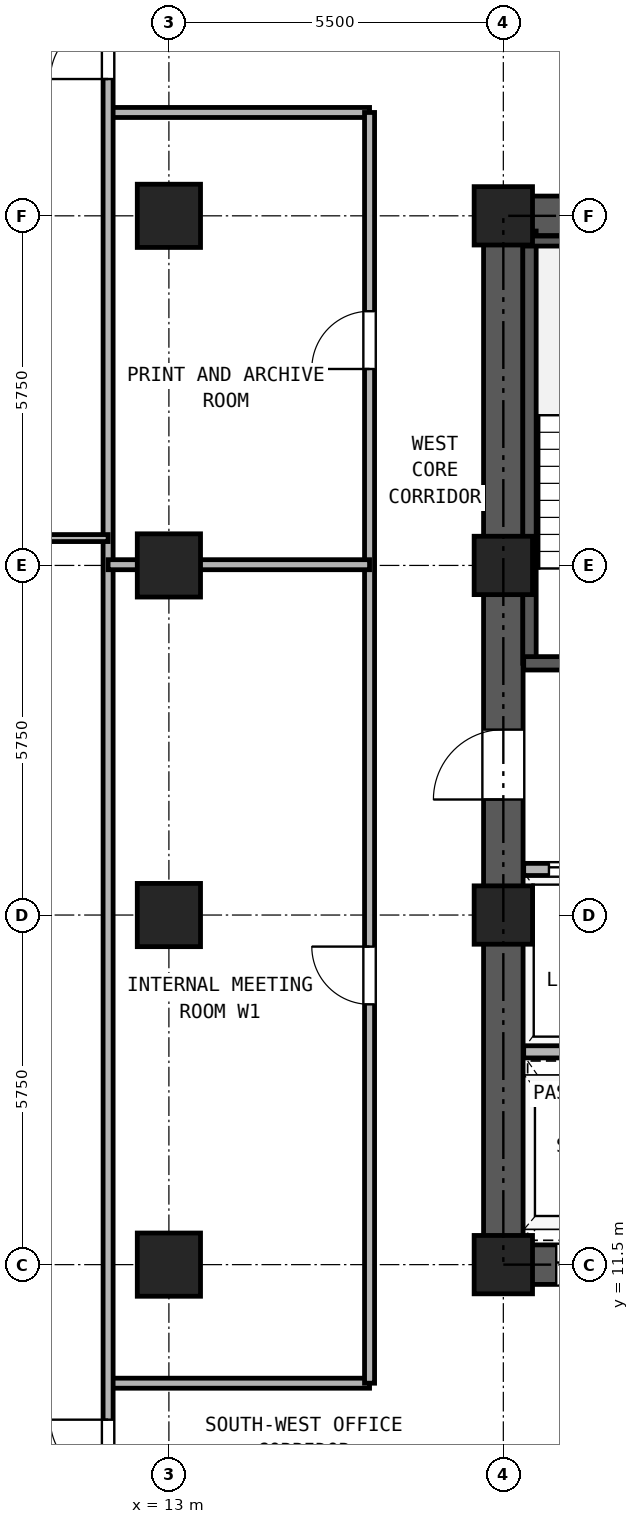
"""IFC4 building model, lengths in metres.
Left out: names, types, materials, properties, quantities, classifications, styles, units other than length and angle.
Written with IfcOpenShell. Run it as: python <this file> out.ifc"""

import sys

from ifc_helpers import new_model, si_unit, direction, frame, frame_2d, origin, origin_2d, place, context, subcontext, project, spatial, rectangle, hollow_rectangle, extrude, source, transform, mapped, element, fill, save


model = new_model("IFC4")
c1 = context("Model", 3, precision=1e-05, world=origin(), true_north=direction((0.0, 1.0)))
c2 = subcontext(c1, "Body", "Model", "MODEL_VIEW")
j1 = project(units=[si_unit("LENGTHUNIT", "METRE"), si_unit("PLANEANGLEUNIT", "RADIAN")], contexts=[c1])
p1 = place(None, origin())
s1 = spatial("IfcSite", under=j1, at=p1, CompositionType="ELEMENT")
p2 = place(p1, origin())
s2 = spatial("IfcBuilding", under=s1, at=p2, CompositionType="ELEMENT")
p3 = place(p2, frame((0.0, 0.0, 62.1)))
s3 = spatial("IfcBuildingStorey", under=s2, at=p3, CompositionType="ELEMENT", Elevation=62.1)
m1 = source(origin(), c2, "Body", "SweptSolid", [
    extrude(hollow_rectangle(XDim=1.04, YDim=1.04, WallThickness=0.065, at=origin_2d()), origin(), (0.0, 0.0, 1.0), 3.32),
])
for number, where, z_axis, x_axis in (
    (1, (13.0, 11.5, 0.0), (0.0, 0.0, 1.0), (1.0, 0.0, 0.0)),
    (2, (13.0, 17.25, 0.0), (0.0, 0.0, 1.0), (1.0, 0.0, 0.0)),
    (3, (13.0, 23.0, 0.0), (0.0, 0.0, 1.0), (1.0, 0.0, 0.0)),
    (4, (13.0, 28.75, 0.0), (0.0, 0.0, 1.0), (1.0, 0.0, 0.0)),
):
    element("IfcColumn", number, at=place(p3, frame(where, z_axis=z_axis, x_axis=x_axis)), inside=s3, PredefinedType="COLUMN", context=c2, shape_type="MappedRepresentation", body=[
        mapped(m1, transform((0.0, 0.0, 0.0), x_axis=(1.0, 0.0, 0.0), y_axis=(0.0, 1.0, 0.0), z_axis=(0.0, 0.0, 1.0), scale=1.0)),
    ])
m2 = source(origin(), c2, "Body", "SweptSolid", [
    extrude(hollow_rectangle(XDim=0.96, YDim=0.96, WallThickness=0.06, at=origin_2d()), origin(), (0.0, 0.0, 1.0), 3.32),
])
for number, where, z_axis, x_axis in (
    (5, (18.5, 11.5, 0.0), (0.0, 0.0, 1.0), (1.0, 0.0, 0.0)),
    (6, (18.5, 17.25, 0.0), (0.0, 0.0, 1.0), (1.0, 0.0, 0.0)),
    (7, (18.5, 23.0, 0.0), (0.0, 0.0, 1.0), (1.0, 0.0, 0.0)),
    (8, (18.5, 28.75, 0.0), (0.0, 0.0, 1.0), (1.0, 0.0, 0.0)),
):
    element("IfcColumn", number, at=place(p3, frame(where, z_axis=z_axis, x_axis=x_axis)), inside=s3, PredefinedType="COLUMN", context=c2, shape_type="MappedRepresentation", body=[
        mapped(m2, transform((0.0, 0.0, 0.0), x_axis=(1.0, 0.0, 0.0), y_axis=(0.0, 1.0, 0.0), z_axis=(0.0, 0.0, 1.0), scale=1.0)),
    ])
p4 = place(p3, frame((18.175, 11.5, 0.0), z_axis=(0.0, 0.0, 1.0), x_axis=(1.0, 0.0, 0.0)))
e9 = element("IfcWall", 9, at=p4, inside=s3, PredefinedType="SHEAR", context=c2, shape_type="SweptSolid", body=[
    extrude(rectangle(XDim=10.65, YDim=0.65, at=frame_2d((5.325, 0.0))), origin(), (0.0, 0.0, 1.0), 3.32),
])
p5 = place(p4, frame((1.195, 0.0, 0.0)))
e10 = element("IfcOpeningElement", 10, at=p5, cuts=e9, PredefinedType="OPENING", context=c2, shape_type="SweptSolid", body=[
    extrude(rectangle(XDim=1.1, YDim=2.25, at=frame_2d((0.55, 1.125))), frame((0.0, 0.335, 0.0), z_axis=(0.0, -1.0, 0.0), x_axis=(1.0, 0.0, 0.0)), (0.0, 0.0, 1.0), 0.67),
])
p6 = place(p4, frame((3.495, 0.0, 0.0)))
e11 = element("IfcOpeningElement", 11, at=p6, cuts=e9, PredefinedType="OPENING", context=c2, shape_type="SweptSolid", body=[
    extrude(rectangle(XDim=1.1, YDim=2.25, at=frame_2d((0.55, 1.125))), frame((0.0, 0.335, 0.0), z_axis=(0.0, -1.0, 0.0), x_axis=(1.0, 0.0, 0.0)), (0.0, 0.0, 1.0), 0.67),
])
p7 = place(p4, frame((5.925, 0.0, 0.0)))
e12 = element("IfcOpeningElement", 12, at=p7, cuts=e9, PredefinedType="OPENING", context=c2, shape_type="SweptSolid", body=[
    extrude(rectangle(XDim=1.1, YDim=2.25, at=frame_2d((0.55, 1.125))), frame((0.0, 0.335, 0.0), z_axis=(0.0, -1.0, 0.0), x_axis=(1.0, 0.0, 0.0)), (0.0, 0.0, 1.0), 0.67),
])
p8 = place(p4, frame((8.325, 0.0, 0.0)))
e13 = element("IfcOpeningElement", 13, at=p8, cuts=e9, PredefinedType="OPENING", context=c2, shape_type="SweptSolid", body=[
    extrude(rectangle(XDim=1.1, YDim=2.25, at=frame_2d((0.55, 1.125))), frame((0.0, 0.335, 0.0), z_axis=(0.0, -1.0, 0.0), x_axis=(1.0, 0.0, 0.0)), (0.0, 0.0, 1.0), 0.67),
])
p9 = place(p3, frame((18.175, 28.75, 0.0), z_axis=(0.0, 0.0, 1.0), x_axis=(1.0, 0.0, 0.0)))
e14 = element("IfcWall", 14, at=p9, inside=s3, PredefinedType="SHEAR", context=c2, shape_type="SweptSolid", body=[
    extrude(rectangle(XDim=10.65, YDim=0.65, at=frame_2d((5.325, 0.0))), origin(), (0.0, 0.0, 1.0), 3.32),
])
p10 = place(p9, frame((4.205, 0.0, 0.0)))
e15 = element("IfcOpeningElement", 15, at=p10, cuts=e14, PredefinedType="OPENING", context=c2, shape_type="SweptSolid", body=[
    extrude(rectangle(XDim=0.9, YDim=2.05, at=frame_2d((0.45, 1.025))), frame((0.0, 0.335, 0.0), z_axis=(0.0, -1.0, 0.0), x_axis=(1.0, 0.0, 0.0)), (0.0, 0.0, 1.0), 0.67),
])
p11 = place(p9, frame((5.745, 0.0, 0.0)))
e16 = element("IfcOpeningElement", 16, at=p11, cuts=e14, PredefinedType="OPENING", context=c2, shape_type="SweptSolid", body=[
    extrude(rectangle(XDim=0.9, YDim=2.05, at=frame_2d((0.45, 1.025))), frame((0.0, 0.335, 0.0), z_axis=(0.0, -1.0, 0.0), x_axis=(1.0, 0.0, 0.0)), (0.0, 0.0, 1.0), 0.67),
])
p12 = place(p3, frame((18.5, 11.825, 0.0), z_axis=(0.0, 0.0, 1.0), x_axis=(0.0, 1.0, 0.0)))
e17 = element("IfcWall", 17, at=p12, inside=s3, PredefinedType="SHEAR", context=c2, shape_type="SweptSolid", body=[
    extrude(rectangle(XDim=16.6, YDim=0.65, at=frame_2d((8.3, 0.0))), origin(), (0.0, 0.0, 1.0), 3.32),
])
p13 = place(p12, frame((7.325, 0.0, 0.0)))
e18 = element("IfcOpeningElement", 18, at=p13, cuts=e17, PredefinedType="OPENING", context=c2, shape_type="SweptSolid", body=[
    extrude(rectangle(XDim=1.15, YDim=2.2, at=frame_2d((0.575, 1.1))), frame((0.0, 0.335, 0.0), z_axis=(0.0, -1.0, 0.0), x_axis=(1.0, 0.0, 0.0)), (0.0, 0.0, 1.0), 0.67),
])
p14 = place(p3, frame((18.93, 21.39, 0.0), z_axis=(0.0, 0.0, 1.0), x_axis=(0.0, 1.0, 0.0)))
e19 = element("IfcWall", 19, at=p14, inside=s3, PredefinedType="SOLIDWALL", context=c2, shape_type="SweptSolid", body=[
    extrude(rectangle(XDim=7.11, YDim=0.22, at=frame_2d((3.555, 0.0))), origin(), (0.0, 0.0, 1.0), 3.32),
])
p15 = place(p3, frame((18.835, 28.335, 0.0), z_axis=(0.0, 0.0, 1.0), x_axis=(1.0, 0.0, 0.0)))
e20 = element("IfcWall", 20, at=p15, inside=s3, PredefinedType="PARTITIONING", context=c2, shape_type="SweptSolid", body=[
    extrude(rectangle(XDim=3.275, YDim=0.165, at=frame_2d((1.638, 0.0))), origin(), (0.0, 0.0, 1.0), 3.32),
])
p16 = place(p3, frame((18.835, 21.39, 0.0), z_axis=(0.0, 0.0, 1.0), x_axis=(1.0, 0.0, 0.0)))
e21 = element("IfcWall", 21, at=p16, inside=s3, PredefinedType="SOLIDWALL", context=c2, shape_type="SweptSolid", body=[
    extrude(rectangle(XDim=6.295, YDim=0.22, at=frame_2d((3.147, 0.0))), origin(), (0.0, 0.0, 1.0), 3.32),
])
p17 = place(p16, frame((1.015, 0.0, 0.0)))
e22 = element("IfcOpeningElement", 22, at=p17, cuts=e21, PredefinedType="OPENING", context=c2, shape_type="SweptSolid", body=[
    extrude(rectangle(XDim=1.15, YDim=2.2, at=frame_2d((0.575, 1.1))), frame((0.0, 0.12, 0.0), z_axis=(0.0, -1.0, 0.0), x_axis=(1.0, 0.0, 0.0)), (0.0, 0.0, 1.0), 0.24),
])
p18 = place(p16, frame((4.745, 0.0, 0.0)))
e23 = element("IfcOpeningElement", 23, at=p18, cuts=e21, PredefinedType="OPENING", context=c2, shape_type="SweptSolid", body=[
    extrude(rectangle(XDim=1.1, YDim=2.25, at=frame_2d((0.55, 1.125))), frame((0.0, 0.12, 0.0), z_axis=(0.0, -1.0, 0.0), x_axis=(1.0, 0.0, 0.0)), (0.0, 0.0, 1.0), 0.24),
])
p19 = place(p3, frame((18.835, 18.0, 0.0), z_axis=(0.0, 0.0, 1.0), x_axis=(1.0, 0.0, 0.0)))
e24 = element("IfcWall", 24, at=p19, inside=s3, PredefinedType="PARTITIONING", context=c2, shape_type="SweptSolid", body=[
    extrude(rectangle(XDim=9.33, YDim=0.2, at=frame_2d((4.665, 0.0))), origin(), (0.0, 0.0, 1.0), 3.32),
])
p20 = place(p19, frame((0.415, 0.0, 0.0)))
e25 = element("IfcOpeningElement", 25, at=p20, cuts=e24, PredefinedType="OPENING", context=c2, shape_type="SweptSolid", body=[
    extrude(rectangle(XDim=1.3, YDim=2.3, at=frame_2d((0.65, 1.15))), frame((0.0, 0.11, 0.0), z_axis=(0.0, -1.0, 0.0), x_axis=(1.0, 0.0, 0.0)), (0.0, 0.0, 1.0), 0.22),
])
p21 = place(p19, frame((2.515, 0.0, 0.0)))
e26 = element("IfcOpeningElement", 26, at=p21, cuts=e24, PredefinedType="OPENING", context=c2, shape_type="SweptSolid", body=[
    extrude(rectangle(XDim=1.3, YDim=2.3, at=frame_2d((0.65, 1.15))), frame((0.0, 0.11, 0.0), z_axis=(0.0, -1.0, 0.0), x_axis=(1.0, 0.0, 0.0)), (0.0, 0.0, 1.0), 0.22),
])
p22 = place(p19, frame((4.915, 0.0, 0.0)))
e27 = element("IfcOpeningElement", 27, at=p22, cuts=e24, PredefinedType="OPENING", context=c2, shape_type="SweptSolid", body=[
    extrude(rectangle(XDim=0.9, YDim=2.05, at=frame_2d((0.45, 1.025))), frame((0.0, 0.11, 0.0), z_axis=(0.0, -1.0, 0.0), x_axis=(1.0, 0.0, 0.0)), (0.0, 0.0, 1.0), 0.22),
])
p23 = place(p19, frame((7.615, 0.0, 0.0)))
e28 = element("IfcOpeningElement", 28, at=p23, cuts=e24, PredefinedType="OPENING", context=c2, shape_type="SweptSolid", body=[
    extrude(rectangle(XDim=0.9, YDim=2.05, at=frame_2d((0.45, 1.025))), frame((0.0, 0.11, 0.0), z_axis=(0.0, -1.0, 0.0), x_axis=(1.0, 0.0, 0.0)), (0.0, 0.0, 1.0), 0.22),
])
p24 = place(p3, frame((18.835, 15.0, 0.0), z_axis=(0.0, 0.0, 1.0), x_axis=(1.0, 0.0, 0.0)))
e29 = element("IfcWall", 29, at=p24, inside=s3, PredefinedType="PARTITIONING", context=c2, shape_type="SweptSolid", body=[
    extrude(rectangle(XDim=9.33, YDim=0.2, at=frame_2d((4.665, 0.0))), origin(), (0.0, 0.0, 1.0), 3.32),
])
for number, where, z_axis, x_axis in (
    (30, (12.0, 9.55, 0.0), (0.0, 0.0, 1.0), (1.0, 0.0, 0.0)),
    (31, (12.0, 30.45, 0.0), (0.0, 0.0, 1.0), (1.0, 0.0, 0.0)),
):
    element("IfcWall", number, at=place(p3, frame(where, z_axis=z_axis, x_axis=x_axis)), inside=s3, PredefinedType="PARTITIONING", context=c2, shape_type="SweptSolid", body=[
        extrude(rectangle(XDim=4.3, YDim=0.165, at=frame_2d((2.15, 0.0))), origin(), (0.0, 0.0, 1.0), 3.32),
    ])
p25 = place(p3, frame((16.3, 9.55, 0.0), z_axis=(0.0, 0.0, 1.0), x_axis=(0.0, 1.0, 0.0)))
e32 = element("IfcWall", 32, at=p25, inside=s3, PredefinedType="PARTITIONING", context=c2, shape_type="SweptSolid", body=[
    extrude(rectangle(XDim=20.9, YDim=0.165, at=frame_2d((10.45, 0.0))), origin(), (0.0, 0.0, 1.0), 3.32),
])
p26 = place(p25, frame((6.231, 0.0, 0.0)))
e33 = element("IfcOpeningElement", 33, at=p26, cuts=e32, PredefinedType="OPENING", context=c2, shape_type="SweptSolid", body=[
    extrude(rectangle(XDim=0.95, YDim=2.15, at=frame_2d((0.475, 1.075))), frame((0.0, 0.093, 0.0), z_axis=(0.0, -1.0, 0.0), x_axis=(1.0, 0.0, 0.0)), (0.0, 0.0, 1.0), 0.185),
])
p27 = place(p25, frame((16.681, 0.0, 0.0)))
e34 = element("IfcOpeningElement", 34, at=p27, cuts=e32, PredefinedType="OPENING", context=c2, shape_type="SweptSolid", body=[
    extrude(rectangle(XDim=0.95, YDim=2.15, at=frame_2d((0.475, 1.075))), frame((0.0, 0.093, 0.0), z_axis=(0.0, -1.0, 0.0), x_axis=(1.0, 0.0, 0.0)), (0.0, 0.0, 1.0), 0.185),
])
p28 = place(p3, frame((12.0, 0.16, 0.0), z_axis=(0.0, 0.0, 1.0), x_axis=(0.0, 1.0, 0.0)))
e35 = element("IfcWall", 35, at=p28, inside=s3, PredefinedType="PARTITIONING", context=c2, shape_type="SweptSolid", body=[
    extrude(rectangle(XDim=40.18, YDim=0.165, at=frame_2d((20.09, 0.0))), origin(), (0.0, 0.0, 1.0), 3.32),
])
p29 = place(p28, frame((7.84, 0.0, 0.0)))
e36 = element("IfcOpeningElement", 36, at=p29, cuts=e35, PredefinedType="OPENING", context=c2, shape_type="SweptSolid", body=[
    extrude(rectangle(XDim=0.95, YDim=2.15, at=frame_2d((0.475, 1.075))), frame((0.0, 0.093, 0.0), z_axis=(0.0, -1.0, 0.0), x_axis=(1.0, 0.0, 0.0)), (0.0, 0.0, 1.0), 0.185),
])
p30 = place(p28, frame((30.84, 0.0, 0.0)))
e37 = element("IfcOpeningElement", 37, at=p30, cuts=e35, PredefinedType="OPENING", context=c2, shape_type="SweptSolid", body=[
    extrude(rectangle(XDim=0.95, YDim=2.15, at=frame_2d((0.475, 1.075))), frame((0.0, 0.093, 0.0), z_axis=(0.0, -1.0, 0.0), x_axis=(1.0, 0.0, 0.0)), (0.0, 0.0, 1.0), 0.185),
])
p31 = place(p3, frame((0.16, 23.45, 0.0), z_axis=(0.0, 0.0, 1.0), x_axis=(1.0, 0.0, 0.0)))
e38 = element("IfcWall", 38, at=p31, inside=s3, PredefinedType="PARTITIONING", context=c2, shape_type="SweptSolid", body=[
    extrude(rectangle(XDim=11.84, YDim=0.115, at=frame_2d((5.92, 0.0))), origin(), (0.0, 0.0, 1.0), 3.32),
])
p32 = place(p3, frame((12.0, 23.012, 0.0), z_axis=(0.0, 0.0, 1.0), x_axis=(1.0, 0.0, 0.0)))
e39 = element("IfcWall", 39, at=p32, inside=s3, PredefinedType="PARTITIONING", context=c2, shape_type="SweptSolid", body=[
    extrude(rectangle(XDim=4.3, YDim=0.165, at=frame_2d((2.15, 0.0))), origin(), (0.0, 0.0, 1.0), 2.539),
])
p33 = place(p20, origin())
e40 = element("IfcDoor", 40, at=p33, inside=s3, OperationType="DOUBLE_DOOR_SLIDING", PredefinedType="DOOR", context=c2, shape_type="SweptSolid", body=[
    extrude(rectangle(XDim=1.3, YDim=2.3, at=frame_2d((0.65, 1.15))), frame((0.0, 0.025, 0.0), z_axis=(0.0, -1.0, 0.0), x_axis=(1.0, 0.0, 0.0)), (0.0, 0.0, 1.0), 0.05),
])
fill(e25, e40)
p34 = place(p13, frame((1.15, 0.0, 0.0), z_axis=(0.0, 0.0, 1.0), x_axis=(-1.0, 0.0, 0.0)))
e41 = element("IfcDoor", 41, at=p34, inside=s3, OperationType="SINGLE_SWING_LEFT", PredefinedType="DOOR", context=c2, shape_type="SweptSolid", body=[
    extrude(rectangle(XDim=1.15, YDim=2.2, at=frame_2d((0.575, 1.1))), frame((0.0, 0.025, 0.0), z_axis=(0.0, -1.0, 0.0), x_axis=(1.0, 0.0, 0.0)), (0.0, 0.0, 1.0), 0.05),
])
fill(e18, e41)
p35 = place(p5, frame((1.1, 0.0, 0.0), z_axis=(0.0, 0.0, 1.0), x_axis=(-1.0, 0.0, 0.0)))
e42 = element("IfcDoor", 42, at=p35, inside=s3, OperationType="DOUBLE_DOOR_SLIDING", PredefinedType="DOOR", context=c2, shape_type="SweptSolid", body=[
    extrude(rectangle(XDim=1.1, YDim=2.25, at=frame_2d((0.55, 1.125))), frame((0.0, 0.025, 0.0), z_axis=(0.0, -1.0, 0.0), x_axis=(1.0, 0.0, 0.0)), (0.0, 0.0, 1.0), 0.05),
])
fill(e10, e42)
p36 = place(p29, frame((0.95, 0.0, 0.0), z_axis=(0.0, 0.0, 1.0), x_axis=(-1.0, 0.0, 0.0)))
e43 = element("IfcDoor", 43, at=p36, inside=s3, OperationType="SINGLE_SWING_RIGHT", PredefinedType="DOOR", context=c2, shape_type="SweptSolid", body=[
    extrude(rectangle(XDim=0.95, YDim=2.15, at=frame_2d((0.475, 1.075))), frame((0.0, 0.025, 0.0), z_axis=(0.0, -1.0, 0.0), x_axis=(1.0, 0.0, 0.0)), (0.0, 0.0, 1.0), 0.05),
])
fill(e36, e43)
p37 = place(p30, frame((0.95, 0.0, 0.0), z_axis=(0.0, 0.0, 1.0), x_axis=(-1.0, 0.0, 0.0)))
e44 = element("IfcDoor", 44, at=p37, inside=s3, OperationType="SINGLE_SWING_LEFT", PredefinedType="DOOR", context=c2, shape_type="SweptSolid", body=[
    extrude(rectangle(XDim=0.95, YDim=2.15, at=frame_2d((0.475, 1.075))), frame((0.0, 0.025, 0.0), z_axis=(0.0, -1.0, 0.0), x_axis=(1.0, 0.0, 0.0)), (0.0, 0.0, 1.0), 0.05),
])
fill(e37, e44)
p38 = place(p26, frame((0.95, 0.0, 0.0), z_axis=(0.0, 0.0, 1.0), x_axis=(-1.0, 0.0, 0.0)))
e45 = element("IfcDoor", 45, at=p38, inside=s3, OperationType="SINGLE_SWING_RIGHT", PredefinedType="DOOR", context=c2, shape_type="SweptSolid", body=[
    extrude(rectangle(XDim=0.95, YDim=2.15, at=frame_2d((0.475, 1.075))), frame((0.0, 0.025, 0.0), z_axis=(0.0, -1.0, 0.0), x_axis=(1.0, 0.0, 0.0)), (0.0, 0.0, 1.0), 0.05),
])
fill(e33, e45)
p39 = place(p27, frame((0.95, 0.0, 0.0), z_axis=(0.0, 0.0, 1.0), x_axis=(-1.0, 0.0, 0.0)))
e46 = element("IfcDoor", 46, at=p39, inside=s3, OperationType="SINGLE_SWING_LEFT", PredefinedType="DOOR", context=c2, shape_type="SweptSolid", body=[
    extrude(rectangle(XDim=0.95, YDim=2.15, at=frame_2d((0.475, 1.075))), frame((0.0, 0.025, 0.0), z_axis=(0.0, -1.0, 0.0), x_axis=(1.0, 0.0, 0.0)), (0.0, 0.0, 1.0), 0.05),
])
fill(e34, e46)
save(model, sys.argv[1])
